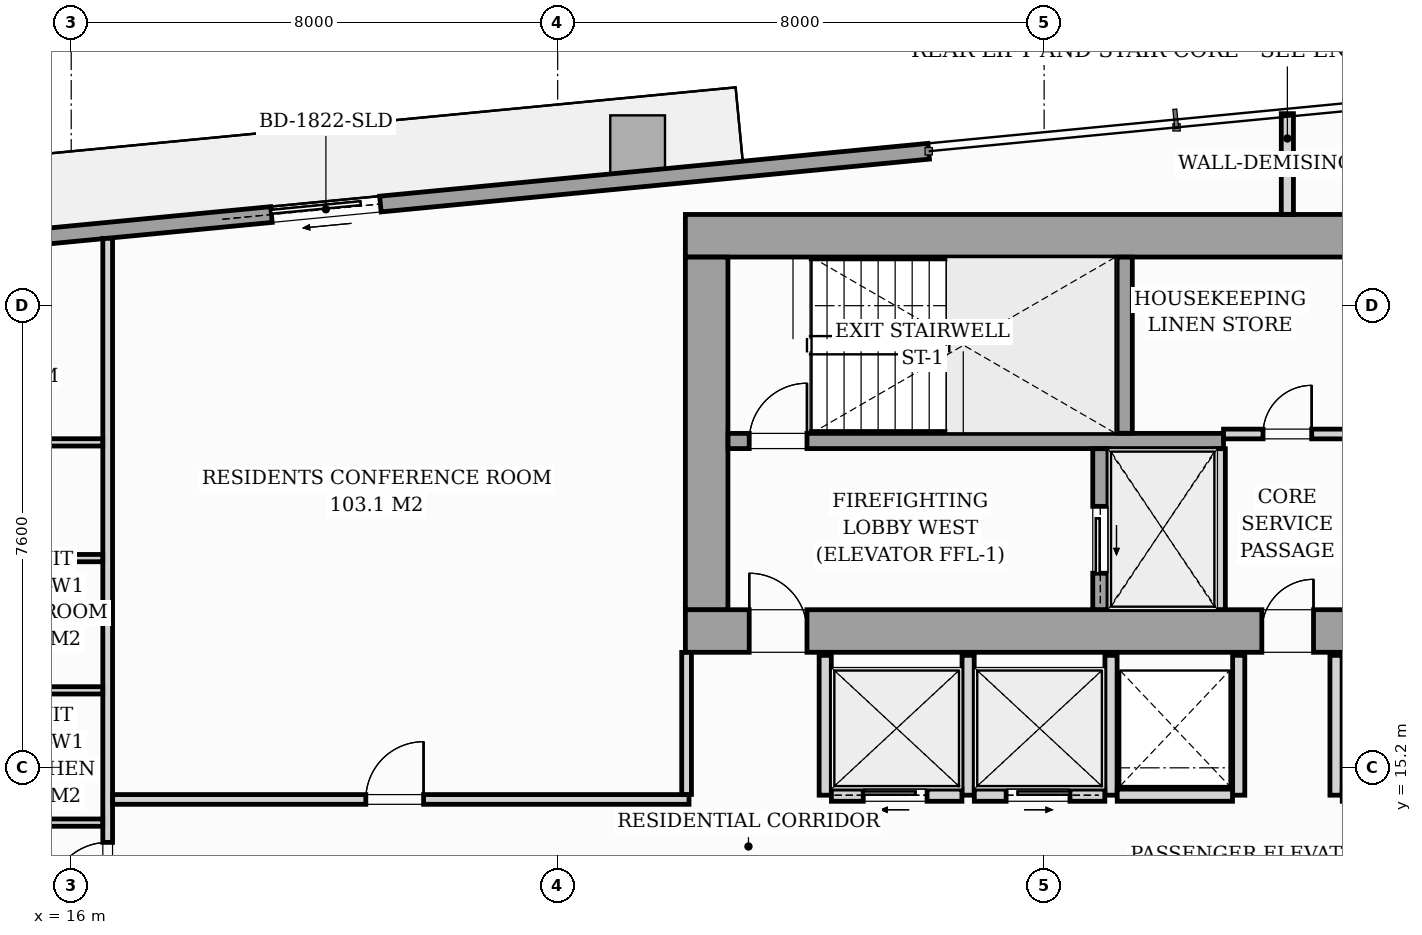
"""IFC4 building model, lengths in metres.
Left out: names, types, materials, properties, quantities, classifications, styles, units other than length and angle.
Written with IfcOpenShell. Run it as: python <this file> out.ifc"""

import sys

from ifc_helpers import new_model, si_unit, direction, frame, frame_2d, origin, origin_2d, place, context, subcontext, project, spatial, rectangle, i_section, extrude, source, transform, mapped, element, fill, save


model = new_model("IFC4")
c1 = context("Model", 3, precision=1e-05, world=origin(), true_north=direction((0.0, 1.0)))
c2 = subcontext(c1, "Body", "Model", "MODEL_VIEW")
j1 = project(units=[si_unit("LENGTHUNIT", "METRE"), si_unit("PLANEANGLEUNIT", "RADIAN")], contexts=[c1])
p1 = place(None, origin())
s1 = spatial("IfcSite", under=j1, at=p1, CompositionType="ELEMENT")
p2 = place(p1, origin())
s2 = spatial("IfcBuilding", under=s1, at=p2, CompositionType="ELEMENT")
p3 = place(p2, frame((0.0, 0.0, 93.8)))
s3 = spatial("IfcBuildingStorey", under=s2, at=p3, CompositionType="ELEMENT", Elevation=93.8)
m1 = source(origin(), c2, "Body", "SweptSolid", [
    extrude(i_section(OverallWidth=0.427, OverallDepth=0.483, WebThickness=0.051, FlangeThickness=0.082, FilletRadius=0.018, at=origin_2d()), origin(), (0.0, 0.0, 1.0), 3.196),
])
for number, where, z_axis, x_axis in (
    (1, (26.4, 17.4, 0.002), (0.0, 0.0, 1.0), (1.0, 0.0, 0.0)),
    (2, (33.12, 17.4, 0.002), (0.0, 0.0, 1.0), (1.0, 0.0, 0.0)),
    (3, (26.4, 24.0, 0.002), (0.0, 0.0, 1.0), (1.0, 0.0, 0.0)),
    (4, (33.12, 24.0, 0.002), (0.0, 0.0, 1.0), (1.0, 0.0, 0.0)),
):
    element("IfcColumn", number, at=place(p3, frame(where, z_axis=z_axis, x_axis=x_axis)), inside=s3, PredefinedType="PILASTER", context=c2, shape_type="MappedRepresentation", body=[
        mapped(m1, transform((0.0, 0.0, 0.0), scale=1.0)),
    ])
m2 = source(origin(), c2, "Body", "SweptSolid", [
    extrude(rectangle(XDim=0.9, YDim=1.1, at=origin_2d()), origin(), (0.0, 0.0, 1.0), 3.196),
])
p4 = place(p3, frame((25.315, 25.38, 0.002), z_axis=(0.0, 0.0, 1.0), x_axis=(0.995396198367, 0.09584575252, 0.0)))
e5 = element("IfcColumn", 5, at=p4, inside=s3, PredefinedType="COLUMN", context=c2, shape_type="MappedRepresentation", body=[
    mapped(m2, transform((0.0, 0.0, 0.0), scale=1.0)),
])
p5 = place(p3, frame((11.08, 23.508, 0.0), z_axis=(0.0, 0.0, 1.0), x_axis=(0.995396638587, 0.095841180552, 0.0)))
e6 = element("IfcWall", 6, at=p5, inside=s3, PredefinedType="STANDARD", context=c2, shape_type="SweptSolid", body=[
    extrude(rectangle(XDim=19.11, YDim=0.26, at=frame_2d((9.555, 0.0))), origin(), (0.0, 0.0, 1.0), 2.94),
])
p6 = place(p5, frame((8.251, 0.0, 0.0)))
e7 = element("IfcOpeningElement", 7, at=p6, cuts=e6, PredefinedType="OPENING", context=c2, shape_type="SweptSolid", body=[
    extrude(rectangle(XDim=1.8, YDim=2.06, at=frame_2d((0.9, 1.03))), frame((0.0, 0.14, 0.0), z_axis=(0.0, -1.0, 0.0), x_axis=(1.0, 0.0, 0.0)), (0.0, 0.0, 1.0), 0.28),
])
p7 = place(p5, frame((2.05, 0.0, 0.65)))
e8 = element("IfcOpeningElement", 8, at=p7, cuts=e6, PredefinedType="OPENING", context=c2, shape_type="SweptSolid", body=[
    extrude(rectangle(XDim=1.6, YDim=1.5, at=frame_2d((0.8, 0.75))), frame((0.0, 0.14, 0.0), z_axis=(0.0, -1.0, 0.0), x_axis=(1.0, 0.0, 0.0)), (0.0, 0.0, 1.0), 0.28),
])
p8 = place(p3, frame((26.1, 17.45, 0.0), z_axis=(0.0, 0.0, 1.0), x_axis=(1.0, 0.0, 0.0)))
e9 = element("IfcWall", 9, at=p8, inside=s3, PredefinedType="SHEAR", context=c2, shape_type="SweptSolid", body=[
    extrude(rectangle(XDim=19.8, YDim=0.7, at=frame_2d((9.9, 0.0))), origin(), (0.0, 0.0, 1.0), 3.2),
])
p9 = place(p8, frame((1.05, 0.0, 0.0)))
e10 = element("IfcOpeningElement", 10, at=p9, cuts=e9, PredefinedType="OPENING", context=c2, shape_type="SweptSolid", body=[
    extrude(rectangle(XDim=0.95, YDim=2.06, at=frame_2d((0.475, 1.03))), frame((0.0, 0.36, 0.0), z_axis=(0.0, -1.0, 0.0), x_axis=(1.0, 0.0, 0.0)), (0.0, 0.0, 1.0), 0.72),
])
p10 = place(p8, frame((9.48, 0.0, 0.0)))
e11 = element("IfcOpeningElement", 11, at=p10, cuts=e9, PredefinedType="OPENING", context=c2, shape_type="SweptSolid", body=[
    extrude(rectangle(XDim=0.85, YDim=2.0, at=frame_2d((0.425, 1.0))), frame((0.0, 0.36, 0.0), z_axis=(0.0, -1.0, 0.0), x_axis=(1.0, 0.0, 0.0)), (0.0, 0.0, 1.0), 0.72),
])
p11 = place(p8, frame((17.65, 0.0, 0.0)))
e12 = element("IfcOpeningElement", 12, at=p11, cuts=e9, PredefinedType="OPENING", context=c2, shape_type="SweptSolid", body=[
    extrude(rectangle(XDim=0.95, YDim=2.06, at=frame_2d((0.475, 1.03))), frame((0.0, 0.36, 0.0), z_axis=(0.0, -1.0, 0.0), x_axis=(1.0, 0.0, 0.0)), (0.0, 0.0, 1.0), 0.72),
])
p12 = place(p3, frame((26.1, 23.95, 0.0), z_axis=(0.0, 0.0, 1.0), x_axis=(1.0, 0.0, 0.0)))
e13 = element("IfcWall", 13, at=p12, inside=s3, PredefinedType="SHEAR", context=c2, shape_type="SweptSolid", body=[
    extrude(rectangle(XDim=19.8, YDim=0.7, at=frame_2d((9.9, 0.0))), origin(), (0.0, 0.0, 1.0), 3.2),
])
p13 = place(p3, frame((26.45, 17.802, 0.0), z_axis=(0.0, 0.0, 1.0), x_axis=(0.0, 1.0, 0.0)))
e14 = element("IfcWall", 14, at=p13, inside=s3, PredefinedType="SHEAR", context=c2, shape_type="SweptSolid", body=[
    extrude(rectangle(XDim=5.796, YDim=0.7, at=frame_2d((2.898, 0.0))), origin(), (0.0, 0.0, 1.0), 3.2),
])
p14 = place(p3, frame((26.802, 20.575, 0.0), z_axis=(0.0, 0.0, 1.0), x_axis=(1.0, 0.0, 0.0)))
e15 = element("IfcWall", 15, at=p14, inside=s3, PredefinedType="SOLIDWALL", context=c2, shape_type="SweptSolid", body=[
    extrude(rectangle(XDim=8.148, YDim=0.25, at=frame_2d((4.074, 0.0))), origin(), (0.0, 0.0, 1.0), 3.2),
])
p15 = place(p14, frame((0.348, 0.0, 0.0)))
e16 = element("IfcOpeningElement", 16, at=p15, cuts=e15, PredefinedType="OPENING", context=c2, shape_type="SweptSolid", body=[
    extrude(rectangle(XDim=0.95, YDim=2.06, at=frame_2d((0.475, 1.03))), frame((0.0, 0.135, 0.0), z_axis=(0.0, -1.0, 0.0), x_axis=(1.0, 0.0, 0.0)), (0.0, 0.0, 1.0), 0.27),
])
p16 = place(p3, frame((33.325, 20.702, 0.0), z_axis=(0.0, 0.0, 1.0), x_axis=(0.0, 1.0, 0.0)))
e17 = element("IfcWall", 17, at=p16, inside=s3, PredefinedType="SOLIDWALL", context=c2, shape_type="SweptSolid", body=[
    extrude(rectangle(XDim=2.896, YDim=0.25, at=frame_2d((1.448, 0.0))), origin(), (0.0, 0.0, 1.0), 3.2),
])
p17 = place(p3, frame((32.925, 17.802, 0.0), z_axis=(0.0, 0.0, 1.0), x_axis=(0.0, 1.0, 0.0)))
e18 = element("IfcWall", 18, at=p17, inside=s3, PredefinedType="SOLIDWALL", context=c2, shape_type="SweptSolid", body=[
    extrude(rectangle(XDim=2.646, YDim=0.25, at=frame_2d((1.323, 0.0))), origin(), (0.0, 0.0, 1.0), 3.2),
])
p18 = place(p17, frame((0.598, 0.0, 0.0)))
e19 = element("IfcOpeningElement", 19, at=p18, cuts=e18, PredefinedType="OPENING", context=c2, shape_type="SweptSolid", body=[
    extrude(rectangle(XDim=1.1, YDim=2.08, at=frame_2d((0.55, 1.04))), frame((0.0, 0.135, 0.0), z_axis=(0.0, -1.0, 0.0), x_axis=(1.0, 0.0, 0.0)), (0.0, 0.0, 1.0), 0.27),
])
p19 = place(p3, frame((34.9, 17.802, 0.0), z_axis=(0.0, 0.0, 1.0), x_axis=(0.0, 1.0, 0.0)))
e20 = element("IfcWall", 20, at=p19, inside=s3, PredefinedType="PARTITIONING", context=c2, shape_type="SweptSolid", body=[
    extrude(rectangle(XDim=2.646, YDim=0.16, at=frame_2d((1.323, 0.0))), origin(), (0.0, 0.0, 1.0), 2.94),
])
p20 = place(p3, frame((34.95, 20.69, 0.0), z_axis=(0.0, 0.0, 1.0), x_axis=(1.0, 0.0, 0.0)))
e21 = element("IfcWall", 21, at=p20, inside=s3, PredefinedType="PARTITIONING", context=c2, shape_type="SweptSolid", body=[
    extrude(rectangle(XDim=2.1, YDim=0.16, at=frame_2d((1.05, 0.0))), origin(), (0.0, 0.0, 1.0), 2.94),
])
p21 = place(p20, frame((0.65, 0.0, 0.0)))
e22 = element("IfcOpeningElement", 22, at=p21, cuts=e21, PredefinedType="OPENING", context=c2, shape_type="SweptSolid", body=[
    extrude(rectangle(XDim=0.8, YDim=2.05, at=frame_2d((0.4, 1.025))), frame((0.0, 0.09, 0.0), z_axis=(0.0, -1.0, 0.0), x_axis=(1.0, 0.0, 0.0)), (0.0, 0.0, 1.0), 0.18),
])
for number, where, z_axis, x_axis in (
    (23, (28.4, 14.75, 0.0), (0.0, 0.0, 1.0), (0.0, 1.0, 0.0)),
    (24, (30.75, 14.75, 0.0), (0.0, 0.0, 1.0), (0.0, 1.0, 0.0)),
    (25, (33.1, 14.75, 0.0), (0.0, 0.0, 1.0), (0.0, 1.0, 0.0)),
):
    element("IfcWall", number, at=place(p3, frame(where, z_axis=z_axis, x_axis=x_axis)), inside=s3, PredefinedType="PARTITIONING", context=c2, shape_type="SweptSolid", body=[
        extrude(rectangle(XDim=2.3, YDim=0.2, at=frame_2d((1.15, 0.0))), origin(), (0.0, 0.0, 1.0), 2.94),
    ])
p22 = place(p3, frame((28.502, 14.75, 0.0), z_axis=(0.0, 0.0, 1.0), x_axis=(1.0, 0.0, 0.0)))
e26 = element("IfcWall", 26, at=p22, inside=s3, PredefinedType="PARTITIONING", context=c2, shape_type="SweptSolid", body=[
    extrude(rectangle(XDim=2.146, YDim=0.2, at=frame_2d((1.073, 0.0))), origin(), (0.0, 0.0, 1.0), 2.94),
])
p23 = place(p22, frame((0.523, 0.0, 0.0)))
e27 = element("IfcOpeningElement", 27, at=p23, cuts=e26, PredefinedType="OPENING", context=c2, shape_type="SweptSolid", body=[
    extrude(rectangle(XDim=1.05, YDim=2.08, at=frame_2d((0.525, 1.04))), frame((0.0, 0.11, 0.0), z_axis=(0.0, -1.0, 0.0), x_axis=(1.0, 0.0, 0.0)), (0.0, 0.0, 1.0), 0.22),
])
p24 = place(p3, frame((30.852, 14.75, 0.0), z_axis=(0.0, 0.0, 1.0), x_axis=(1.0, 0.0, 0.0)))
e28 = element("IfcWall", 28, at=p24, inside=s3, PredefinedType="PARTITIONING", context=c2, shape_type="SweptSolid", body=[
    extrude(rectangle(XDim=2.146, YDim=0.2, at=frame_2d((1.073, 0.0))), origin(), (0.0, 0.0, 1.0), 2.94),
])
p25 = place(p24, frame((0.523, 0.0, 0.0)))
e29 = element("IfcOpeningElement", 29, at=p25, cuts=e28, PredefinedType="OPENING", context=c2, shape_type="SweptSolid", body=[
    extrude(rectangle(XDim=1.05, YDim=2.08, at=frame_2d((0.525, 1.04))), frame((0.0, 0.11, 0.0), z_axis=(0.0, -1.0, 0.0), x_axis=(1.0, 0.0, 0.0)), (0.0, 0.0, 1.0), 0.22),
])
p26 = place(p3, frame((35.2, 14.75, 0.0), z_axis=(0.0, 0.0, 1.0), x_axis=(0.0, 1.0, 0.0)))
e30 = element("IfcWall", 30, at=p26, inside=s3, PredefinedType="PARTITIONING", context=c2, shape_type="SweptSolid", body=[
    extrude(rectangle(XDim=2.3, YDim=0.2, at=frame_2d((1.15, 0.0))), origin(), (0.0, 0.0, 1.0), 2.94),
])
p27 = place(p3, frame((33.202, 14.75, 0.0), z_axis=(0.0, 0.0, 1.0), x_axis=(1.0, 0.0, 0.0)))
e31 = element("IfcWall", 31, at=p27, inside=s3, PredefinedType="PARTITIONING", context=c2, shape_type="SweptSolid", body=[
    extrude(rectangle(XDim=1.896, YDim=0.2, at=frame_2d((0.948, 0.0))), origin(), (0.0, 0.0, 1.0), 2.94),
])
p28 = place(p3, frame((36.8, 14.75, 0.0), z_axis=(0.0, 0.0, 1.0), x_axis=(0.0, 1.0, 0.0)))
e32 = element("IfcWall", 32, at=p28, inside=s3, PredefinedType="PARTITIONING", context=c2, shape_type="SweptSolid", body=[
    extrude(rectangle(XDim=2.3, YDim=0.2, at=frame_2d((1.15, 0.0))), origin(), (0.0, 0.0, 1.0), 2.94),
])
p29 = place(p3, frame((16.6, 12.712, 0.0), z_axis=(0.0, 0.0, 1.0), x_axis=(0.0, 1.0, 0.0)))
e33 = element("IfcWall", 33, at=p29, inside=s3, PredefinedType="PARTITIONING", context=c2, shape_type="SweptSolid", body=[
    extrude(rectangle(XDim=11.195, YDim=0.16, at=frame_2d((5.598, 0.0))), origin(), (0.0, 0.0, 1.0), 2.94),
])
p30 = place(p29, frame((0.312, 0.0, 0.0)))
e34 = element("IfcOpeningElement", 34, at=p30, cuts=e33, PredefinedType="OPENING", context=c2, shape_type="SweptSolid", body=[
    extrude(rectangle(XDim=0.95, YDim=2.06, at=frame_2d((0.475, 1.03))), frame((0.0, 0.09, 0.0), z_axis=(0.0, -1.0, 0.0), x_axis=(1.0, 0.0, 0.0)), (0.0, 0.0, 1.0), 0.18),
])
p31 = place(p3, frame((36.0, 24.302, 0.0), z_axis=(0.0, 0.0, 1.0), x_axis=(0.0, 1.0, 0.0)))
e35 = element("IfcWall", 35, at=p31, inside=s3, PredefinedType="PARTITIONING", context=c2, shape_type="SweptSolid", body=[
    extrude(rectangle(XDim=1.656, YDim=0.2, at=frame_2d((0.828, 0.0))), origin(), (0.0, 0.0, 1.0), 2.94),
])
p32 = place(p3, frame((14.262, 16.474, 0.0), z_axis=(0.0, 0.0, 1.0), x_axis=(1.0, 0.0, 0.0)))
e36 = element("IfcWall", 36, at=p32, inside=s3, PredefinedType="PARTITIONING", context=c2, shape_type="SweptSolid", body=[
    extrude(rectangle(XDim=2.256, YDim=0.12, at=frame_2d((1.128, 0.0))), origin(), (0.0, 0.0, 1.0), 2.94),
])
p33 = place(p3, frame((14.262, 14.299, 0.0), z_axis=(0.0, 0.0, 1.0), x_axis=(1.0, 0.0, 0.0)))
e37 = element("IfcWall", 37, at=p33, inside=s3, PredefinedType="PARTITIONING", context=c2, shape_type="SweptSolid", body=[
    extrude(rectangle(XDim=2.256, YDim=0.12, at=frame_2d((1.128, 0.0))), origin(), (0.0, 0.0, 1.0), 2.063),
])
p34 = place(p3, frame((14.262, 18.649, 0.0), z_axis=(0.0, 0.0, 1.0), x_axis=(1.0, 0.0, 0.0)))
e38 = element("IfcWall", 38, at=p34, inside=s3, PredefinedType="PARTITIONING", context=c2, shape_type="SweptSolid", body=[
    extrude(rectangle(XDim=2.256, YDim=0.12, at=frame_2d((1.128, 0.0))), origin(), (0.0, 0.0, 1.0), 2.94),
])
p35 = place(p3, frame((8.933, 20.552, 0.0), z_axis=(0.0, 0.0, 1.0), x_axis=(1.0, 0.0, 0.0)))
e39 = element("IfcWall", 39, at=p35, inside=s3, PredefinedType="PARTITIONING", context=c2, shape_type="SweptSolid", body=[
    extrude(rectangle(XDim=7.585, YDim=0.12, at=frame_2d((3.792, 0.0))), origin(), (0.0, 0.0, 1.0), 2.94),
])
p36 = place(p35, frame((3.944, 0.0, 0.0)))
e40 = element("IfcOpeningElement", 40, at=p36, cuts=e39, PredefinedType="OPENING", context=c2, shape_type="SweptSolid", body=[
    extrude(rectangle(XDim=0.55, YDim=2.0, at=frame_2d((0.275, 1.0))), frame((0.0, 0.07, 0.0), z_axis=(0.0, -1.0, 0.0), x_axis=(1.0, 0.0, 0.0)), (0.0, 0.0, 1.0), 0.14),
])
p37 = place(p3, frame((16.682, 14.68, 0.0), z_axis=(0.0, 0.0, 1.0), x_axis=(1.0, 0.0, 0.0)))
e41 = element("IfcWall", 41, at=p37, inside=s3, PredefinedType="PARTITIONING", context=c2, shape_type="SweptSolid", body=[
    extrude(rectangle(XDim=9.478, YDim=0.16, at=frame_2d((4.739, 0.0))), origin(), (0.0, 0.0, 1.0), 2.94),
])
p38 = place(p37, frame((4.163, 0.0, 0.0)))
e42 = element("IfcOpeningElement", 42, at=p38, cuts=e41, PredefinedType="OPENING", context=c2, shape_type="SweptSolid", body=[
    extrude(rectangle(XDim=0.95, YDim=2.06, at=frame_2d((0.475, 1.03))), frame((0.0, 0.09, 0.0), z_axis=(0.0, -1.0, 0.0), x_axis=(1.0, 0.0, 0.0)), (0.0, 0.0, 1.0), 0.18),
])
p39 = place(p3, frame((26.12, 14.762, 0.0), z_axis=(0.0, 0.0, 1.0), x_axis=(0.0, 1.0, 0.0)))
e43 = element("IfcWall", 43, at=p39, inside=s3, PredefinedType="PARTITIONING", context=c2, shape_type="SweptSolid", body=[
    extrude(rectangle(XDim=2.336, YDim=0.16, at=frame_2d((1.168, 0.0))), origin(), (0.0, 0.0, 1.0), 2.94),
])
m3 = source(origin(), c2, "Body", "SweptSolid", [
    extrude(rectangle(XDim=1.8, YDim=2.06, at=frame_2d((0.9, 1.03))), frame((0.0, 0.025, 0.0), z_axis=(0.0, -1.0, 0.0), x_axis=(1.0, 0.0, 0.0)), (0.0, 0.0, 1.0), 0.05),
])
p40 = place(p6, origin())
e44 = element("IfcDoor", 44, at=p40, inside=s3, OperationType="SLIDING_TO_LEFT", PredefinedType="DOOR", context=c2, shape_type="MappedRepresentation", body=[
    mapped(m3, transform((0.0, 0.0, 0.0), scale=1.0)),
])
fill(e7, e44)
m4 = source(origin(), c2, "Body", "SweptSolid", [
    extrude(rectangle(XDim=0.95, YDim=2.06, at=frame_2d((0.475, 1.03))), frame((0.0, 0.025, 0.0), z_axis=(0.0, -1.0, 0.0), x_axis=(1.0, 0.0, 0.0)), (0.0, 0.0, 1.0), 0.05),
])
p41 = place(p9, origin())
e45 = element("IfcDoor", 45, at=p41, inside=s3, OperationType="SINGLE_SWING_LEFT", PredefinedType="DOOR", context=c2, shape_type="MappedRepresentation", body=[
    mapped(m4, transform((0.0, 0.0, 0.0), scale=1.0)),
])
fill(e10, e45)
m5 = source(origin(), c2, "Body", "SweptSolid", [
    extrude(rectangle(XDim=0.85, YDim=2.0, at=frame_2d((0.425, 1.0))), frame((0.0, 0.025, 0.0), z_axis=(0.0, -1.0, 0.0), x_axis=(1.0, 0.0, 0.0)), (0.0, 0.0, 1.0), 0.05),
])
p42 = place(p10, origin())
e46 = element("IfcDoor", 46, at=p42, inside=s3, OperationType="SINGLE_SWING_RIGHT", PredefinedType="DOOR", context=c2, shape_type="MappedRepresentation", body=[
    mapped(m5, transform((0.0, 0.0, 0.0), scale=1.0)),
])
fill(e11, e46)
p43 = place(p15, origin())
e47 = element("IfcDoor", 47, at=p43, inside=s3, OperationType="SINGLE_SWING_RIGHT", PredefinedType="DOOR", context=c2, shape_type="MappedRepresentation", body=[
    mapped(m4, transform((0.0, 0.0, 0.0), scale=1.0)),
])
fill(e16, e47)
m6 = source(origin(), c2, "Body", "SweptSolid", [
    extrude(rectangle(XDim=1.1, YDim=2.08, at=frame_2d((0.55, 1.04))), frame((0.0, 0.025, 0.0), z_axis=(0.0, -1.0, 0.0), x_axis=(1.0, 0.0, 0.0)), (0.0, 0.0, 1.0), 0.05),
])
p44 = place(p18, origin())
e48 = element("IfcDoor", 48, at=p44, inside=s3, OperationType="SLIDING_TO_LEFT", PredefinedType="DOOR", context=c2, shape_type="MappedRepresentation", body=[
    mapped(m6, transform((0.0, 0.0, 0.0), scale=1.0)),
])
fill(e19, e48)
m7 = source(origin(), c2, "Body", "SweptSolid", [
    extrude(rectangle(XDim=0.8, YDim=2.05, at=frame_2d((0.4, 1.025))), frame((0.0, 0.025, 0.0), z_axis=(0.0, -1.0, 0.0), x_axis=(1.0, 0.0, 0.0)), (0.0, 0.0, 1.0), 0.05),
])
p45 = place(p21, origin())
e49 = element("IfcDoor", 49, at=p45, inside=s3, OperationType="SINGLE_SWING_RIGHT", PredefinedType="DOOR", context=c2, shape_type="MappedRepresentation", body=[
    mapped(m7, transform((0.0, 0.0, 0.0), scale=1.0)),
])
fill(e22, e49)
m8 = source(origin(), c2, "Body", "SweptSolid", [
    extrude(rectangle(XDim=1.05, YDim=2.08, at=frame_2d((0.525, 1.04))), frame((0.0, 0.025, 0.0), z_axis=(0.0, -1.0, 0.0), x_axis=(1.0, 0.0, 0.0)), (0.0, 0.0, 1.0), 0.05),
])
p46 = place(p23, origin())
e50 = element("IfcDoor", 50, at=p46, inside=s3, OperationType="SLIDING_TO_LEFT", PredefinedType="DOOR", context=c2, shape_type="MappedRepresentation", body=[
    mapped(m8, transform((0.0, 0.0, 0.0), scale=1.0)),
])
fill(e27, e50)
p47 = place(p25, origin())
e51 = element("IfcDoor", 51, at=p47, inside=s3, OperationType="SLIDING_TO_RIGHT", PredefinedType="DOOR", context=c2, shape_type="MappedRepresentation", body=[
    mapped(m8, transform((0.0, 0.0, 0.0), scale=1.0)),
])
fill(e29, e51)
m9 = source(origin(), c2, "Body", "SweptSolid", [
    extrude(rectangle(XDim=0.95, YDim=2.06, at=frame_2d((0.475, 1.03))), frame((0.0, 0.025, 0.0), z_axis=(0.0, -1.0, 0.0), x_axis=(1.0, 0.0, 0.0)), (0.0, 0.0, 1.0), 0.05),
])
p48 = place(p30, origin())
e52 = element("IfcDoor", 52, at=p48, inside=s3, OperationType="SINGLE_SWING_LEFT", PredefinedType="DOOR", context=c2, shape_type="MappedRepresentation", body=[
    mapped(m9, transform((0.0, 0.0, 0.0), scale=1.0)),
])
fill(e34, e52)
p49 = place(p38, origin())
e53 = element("IfcDoor", 53, at=p49, inside=s3, OperationType="SINGLE_SWING_RIGHT", PredefinedType="DOOR", context=c2, shape_type="MappedRepresentation", body=[
    mapped(m9, transform((0.0, 0.0, 0.0), scale=1.0)),
])
fill(e42, e53)
save(model, sys.argv[1])
